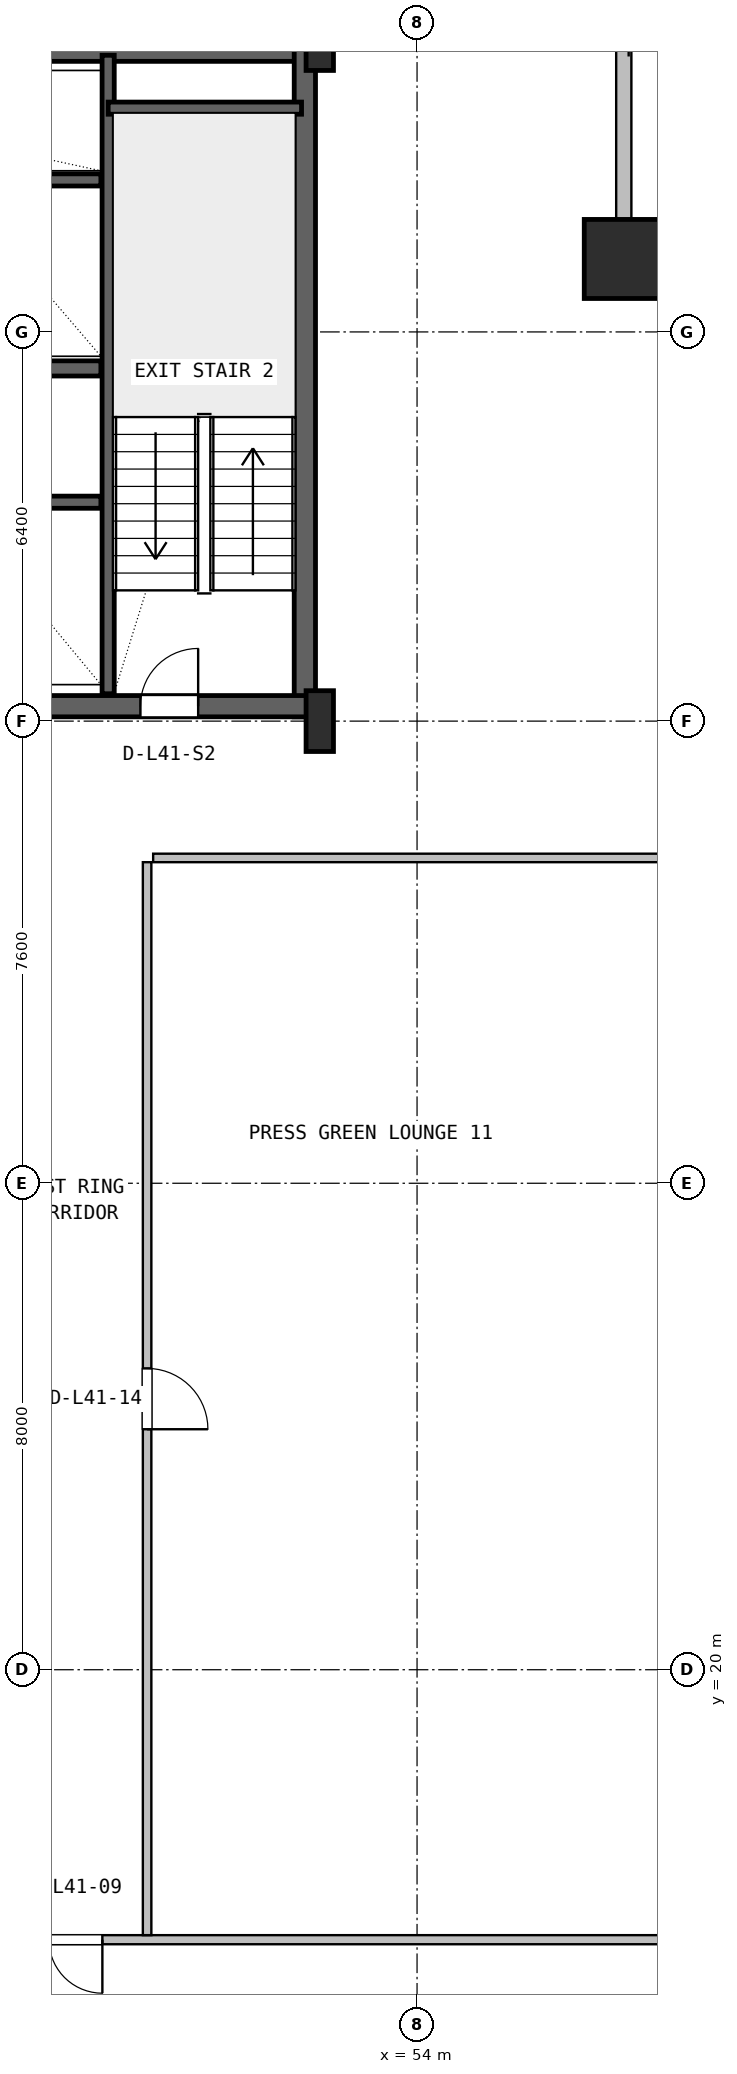
"""IFC4 building model, lengths in metres.
Left out: names, types, materials, properties, quantities, classifications, styles, units other than length and angle.
Written with IfcOpenShell. Run it as: python <this file> out.ifc"""

import sys

from ifc_helpers import new_model, si_unit, direction, frame, frame_2d, origin, origin_2d, place, context, subcontext, project, spatial, rectangle, hollow_rectangle, i_section, extrude, source, transform, mapped, element, fill, save


model = new_model("IFC4")
c1 = context("Model", 3, precision=1e-05, world=origin(), true_north=direction((0.0, 1.0)))
c2 = subcontext(c1, "Body", "Model", "MODEL_VIEW")
j1 = project(units=[si_unit("LENGTHUNIT", "METRE"), si_unit("PLANEANGLEUNIT", "RADIAN")], contexts=[c1])
p1 = place(None, origin())
s1 = spatial("IfcSite", under=j1, at=p1, CompositionType="ELEMENT")
p2 = place(p1, origin())
s2 = spatial("IfcBuilding", under=s1, at=p2, CompositionType="ELEMENT")
p3 = place(p2, frame((0.0, 0.0, 168.6)))
s3 = spatial("IfcBuildingStorey", under=s2, at=p3, CompositionType="ELEMENT", Elevation=168.6)
p4 = place(p3, frame((15.6, 46.625, 0.0), z_axis=(0.0, 0.0, 1.0), x_axis=(1.0, 0.0, 0.0)))
e1 = element("IfcWall", 1, at=p4, inside=s3, PredefinedType="SHEAR", context=c2, shape_type="SweptSolid", body=[
    extrude(rectangle(XDim=36.8, YDim=0.35, at=frame_2d((18.4, 0.0))), origin(), (0.0, 0.0, 1.0), 3.55),
])
p5 = place(p3, frame((52.155, 35.67, 0.0), z_axis=(0.0, 0.0, 1.0), x_axis=(0.0, 1.0, 0.0)))
e2 = element("IfcWall", 2, at=p5, inside=s3, PredefinedType="SHEAR", context=c2, shape_type="SweptSolid", body=[
    extrude(rectangle(XDim=11.13, YDim=0.35, at=frame_2d((5.565, 0.0))), origin(), (0.0, 0.0, 1.0), 3.55),
])
p6 = place(p3, frame((43.2, 35.845, 0.0), z_axis=(0.0, 0.0, 1.0), x_axis=(1.0, 0.0, 0.0)))
e3 = element("IfcWall", 3, at=p6, inside=s3, PredefinedType="SHEAR", context=c2, shape_type="SweptSolid", body=[
    extrude(rectangle(XDim=9.13, YDim=0.35, at=frame_2d((4.565, 0.0))), origin(), (0.0, 0.0, 1.0), 3.55),
])
p7 = place(p6, frame((6.25, 0.0, 0.0)))
e4 = element("IfcOpeningElement", 4, at=p7, cuts=e3, PredefinedType="OPENING", context=c2, shape_type="SweptSolid", body=[
    extrude(rectangle(XDim=0.95, YDim=2.1, at=frame_2d((0.475, 1.05))), frame((0.0, 0.185, 0.0), z_axis=(0.0, -1.0, 0.0), x_axis=(1.0, 0.0, 0.0)), (0.0, 0.0, 1.0), 0.37),
])
m1 = source(origin(), c2, "Body", "SweptSolid", [
    extrude(i_section(OverallWidth=0.45, OverallDepth=1.0, WebThickness=0.016, FlangeThickness=0.03, FilletRadius=0.016, at=origin_2d()), origin(), (0.0, 0.0, 1.0), 3.8),
])
for number, where, z_axis, x_axis in (
    (5, (52.4, 35.6, 0.0), (0.0, 0.0, 1.0), (1.0, 0.0, 0.0)),
    (6, (52.4, 46.8, 0.0), (0.0, 0.0, 1.0), (1.0, 0.0, 0.0)),
):
    element("IfcColumn", number, at=place(p3, frame(where, z_axis=z_axis, x_axis=x_axis)), inside=s3, PredefinedType="COLUMN", context=c2, shape_type="MappedRepresentation", body=[
        mapped(m1, transform((0.0, 0.0, 0.0), x_axis=(1.0, 0.0, 0.0), y_axis=(0.0, 1.0, 0.0), z_axis=(0.0, 0.0, 1.0), scale=1.0)),
    ])
m2 = source(origin(), c2, "Body", "SweptSolid", [
    extrude(hollow_rectangle(XDim=1.3, YDim=1.3, WallThickness=0.05, at=origin_2d()), origin(), (0.0, 0.0, 1.0), 3.8),
])
p8 = place(p3, frame((57.4, 43.2, 0.0), z_axis=(0.0, 0.0, 1.0), x_axis=(1.0, 0.0, 0.0)))
e7 = element("IfcColumn", 7, at=p8, inside=s3, PredefinedType="COLUMN", context=c2, shape_type="MappedRepresentation", body=[
    mapped(m2, transform((0.0, 0.0, 0.0), x_axis=(1.0, 0.0, 0.0), y_axis=(0.0, 1.0, 0.0), z_axis=(0.0, 0.0, 1.0), scale=1.0)),
])
p9 = place(p3, frame((57.53, 43.2, 0.0), z_axis=(0.0, 0.0, 1.0), x_axis=(1.0, 0.0, 0.0)))
e8 = element("IfcWall", 8, at=p9, inside=s3, PredefinedType="SOLIDWALL", context=c2, shape_type="SweptSolid", body=[
    extrude(rectangle(XDim=3.39, YDim=0.25, at=frame_2d((1.695, 0.0))), origin(), (0.0, 0.0, 1.0), 3.53),
])
p10 = place(p3, frame((57.4, 43.12, 0.0), z_axis=(0.0, 0.0, 1.0), x_axis=(0.0, 1.0, 0.0)))
e9 = element("IfcWall", 9, at=p10, inside=s3, PredefinedType="SOLIDWALL", context=c2, shape_type="SweptSolid", body=[
    extrude(rectangle(XDim=3.6, YDim=0.25, at=frame_2d((1.8, 0.0))), origin(), (0.0, 0.0, 1.0), 3.108),
])
p11 = place(p3, frame((48.92, 36.05, 0.0), z_axis=(0.0, 0.0, 1.0), x_axis=(0.0, 1.0, 0.0)))
e10 = element("IfcWall", 10, at=p11, inside=s3, PredefinedType="SHEAR", context=c2, shape_type="SweptSolid", body=[
    extrude(rectangle(XDim=10.5, YDim=0.2, at=frame_2d((5.25, 0.0))), origin(), (0.0, 0.0, 1.0), 3.55),
])
p12 = place(p3, frame((48.92, 45.68, 0.0), z_axis=(0.0, 0.0, 1.0), x_axis=(1.0, 0.0, 0.0)))
e11 = element("IfcWall", 11, at=p12, inside=s3, PredefinedType="SHEAR", context=c2, shape_type="SweptSolid", body=[
    extrude(rectangle(XDim=3.18, YDim=0.2, at=frame_2d((1.59, 0.0))), origin(), (0.0, 0.0, 1.0), 3.55),
])
p13 = place(p3, frame((24.98, 41.4, 0.0), z_axis=(0.0, 0.0, 1.0), x_axis=(1.0, 0.0, 0.0)))
e12 = element("IfcWall", 12, at=p13, inside=s3, PredefinedType="SHEAR", context=c2, shape_type="SweptSolid", body=[
    extrude(rectangle(XDim=23.82, YDim=0.25, at=frame_2d((11.91, 0.0))), origin(), (0.0, 0.0, 1.0), 3.55),
])
p14 = place(p13, frame((8.87, 0.0, 0.0)))
e13 = element("IfcOpeningElement", 13, at=p14, cuts=e12, PredefinedType="OPENING", context=c2, shape_type="SweptSolid", body=[
    extrude(rectangle(XDim=1.1, YDim=2.18, at=frame_2d((0.55, 1.09))), frame((0.0, 0.135, 0.0), z_axis=(0.0, -1.0, 0.0), x_axis=(1.0, 0.0, 0.0)), (0.0, 0.0, 1.0), 0.27),
])
p15 = place(p13, frame((11.47, 0.0, 0.0)))
e14 = element("IfcOpeningElement", 14, at=p15, cuts=e12, PredefinedType="OPENING", context=c2, shape_type="SweptSolid", body=[
    extrude(rectangle(XDim=1.1, YDim=2.18, at=frame_2d((0.55, 1.09))), frame((0.0, 0.135, 0.0), z_axis=(0.0, -1.0, 0.0), x_axis=(1.0, 0.0, 0.0)), (0.0, 0.0, 1.0), 0.27),
])
p16 = place(p13, frame((14.07, 0.0, 0.0)))
e15 = element("IfcOpeningElement", 15, at=p16, cuts=e12, PredefinedType="OPENING", context=c2, shape_type="SweptSolid", body=[
    extrude(rectangle(XDim=1.1, YDim=2.18, at=frame_2d((0.55, 1.09))), frame((0.0, 0.135, 0.0), z_axis=(0.0, -1.0, 0.0), x_axis=(1.0, 0.0, 0.0)), (0.0, 0.0, 1.0), 0.27),
])
p17 = place(p13, frame((3.56, 0.0, 0.0)))
e16 = element("IfcOpeningElement", 16, at=p17, cuts=e12, PredefinedType="OPENING", context=c2, shape_type="SweptSolid", body=[
    extrude(rectangle(XDim=1.0, YDim=2.08, at=frame_2d((0.5, 1.04))), frame((0.0, 0.135, 0.0), z_axis=(0.0, -1.0, 0.0), x_axis=(1.0, 0.0, 0.0)), (0.0, 0.0, 1.0), 0.27),
])
p18 = place(p3, frame((41.22, 44.5, 0.0), z_axis=(0.0, 0.0, 1.0), x_axis=(1.0, 0.0, 0.0)))
e17 = element("IfcWall", 17, at=p18, inside=s3, PredefinedType="SHEAR", context=c2, shape_type="SweptSolid", body=[
    extrude(rectangle(XDim=7.58, YDim=0.2, at=frame_2d((3.79, 0.0))), origin(), (0.0, 0.0, 1.0), 3.55),
])
p19 = place(p3, frame((43.65, 39.2, 0.0), z_axis=(0.0, 0.0, 1.0), x_axis=(1.0, 0.0, 0.0)))
e18 = element("IfcWall", 18, at=p19, inside=s3, PredefinedType="SHEAR", context=c2, shape_type="SweptSolid", body=[
    extrude(rectangle(XDim=5.15, YDim=0.2, at=frame_2d((2.575, 0.0))), origin(), (0.0, 0.0, 1.0), 3.55),
])
p20 = place(p3, frame((7.18, 15.56, 0.0), z_axis=(0.0, 0.0, 1.0), x_axis=(1.0, 0.0, 0.0)))
e19 = element("IfcWall", 19, at=p20, inside=s3, PredefinedType="PARTITIONING", context=c2, shape_type="SweptSolid", body=[
    extrude(rectangle(XDim=53.64, YDim=0.15, at=frame_2d((26.82, 0.0))), origin(), (0.0, 0.0, 1.0), 2.909),
])
p21 = place(p20, frame((13.665, 0.0, 0.0)))
e20 = element("IfcOpeningElement", 20, at=p21, cuts=e19, PredefinedType="OPENING", context=c2, shape_type="SweptSolid", body=[
    extrude(rectangle(XDim=0.92, YDim=2.08, at=frame_2d((0.46, 1.04))), frame((0.0, 0.085, 0.0), z_axis=(0.0, -1.0, 0.0), x_axis=(1.0, 0.0, 0.0)), (0.0, 0.0, 1.0), 0.17),
])
p22 = place(p20, frame((17.955, 0.0, 0.0)))
e21 = element("IfcOpeningElement", 21, at=p22, cuts=e19, PredefinedType="OPENING", context=c2, shape_type="SweptSolid", body=[
    extrude(rectangle(XDim=0.92, YDim=2.08, at=frame_2d((0.46, 1.04))), frame((0.0, 0.085, 0.0), z_axis=(0.0, -1.0, 0.0), x_axis=(1.0, 0.0, 0.0)), (0.0, 0.0, 1.0), 0.17),
])
p23 = place(p20, frame((24.915, 0.0, 0.0)))
e22 = element("IfcOpeningElement", 22, at=p23, cuts=e19, PredefinedType="OPENING", context=c2, shape_type="SweptSolid", body=[
    extrude(rectangle(XDim=1.05, YDim=2.1, at=frame_2d((0.525, 1.05))), frame((0.0, 0.085, 0.0), z_axis=(0.0, -1.0, 0.0), x_axis=(1.0, 0.0, 0.0)), (0.0, 0.0, 1.0), 0.17),
])
p24 = place(p20, frame((31.13, 0.0, 0.0)))
e23 = element("IfcOpeningElement", 23, at=p24, cuts=e19, PredefinedType="OPENING", context=c2, shape_type="SweptSolid", body=[
    extrude(rectangle(XDim=0.88, YDim=2.06, at=frame_2d((0.44, 1.03))), frame((0.0, 0.085, 0.0), z_axis=(0.0, -1.0, 0.0), x_axis=(1.0, 0.0, 0.0)), (0.0, 0.0, 1.0), 0.17),
])
p25 = place(p20, frame((36.41, 0.0, 0.0)))
e24 = element("IfcOpeningElement", 24, at=p25, cuts=e19, PredefinedType="OPENING", context=c2, shape_type="SweptSolid", body=[
    extrude(rectangle(XDim=1.0, YDim=2.1, at=frame_2d((0.5, 1.05))), frame((0.0, 0.085, 0.0), z_axis=(0.0, -1.0, 0.0), x_axis=(1.0, 0.0, 0.0)), (0.0, 0.0, 1.0), 0.17),
])
p26 = place(p20, frame((40.765, 0.0, 0.0)))
e25 = element("IfcOpeningElement", 25, at=p26, cuts=e19, PredefinedType="OPENING", context=c2, shape_type="SweptSolid", body=[
    extrude(rectangle(XDim=0.88, YDim=2.06, at=frame_2d((0.44, 1.03))), frame((0.0, 0.085, 0.0), z_axis=(0.0, -1.0, 0.0), x_axis=(1.0, 0.0, 0.0)), (0.0, 0.0, 1.0), 0.17),
])
p27 = place(p3, frame((49.66, 33.35, 0.0), z_axis=(0.0, 0.0, 1.0), x_axis=(1.0, 0.0, 0.0)))
e26 = element("IfcWall", 26, at=p27, inside=s3, PredefinedType="PARTITIONING", context=c2, shape_type="SweptSolid", body=[
    extrude(rectangle(XDim=11.16, YDim=0.14, at=frame_2d((5.58, 0.0))), origin(), (0.0, 0.0, 1.0), 3.108),
])
p28 = place(p3, frame((49.56, 15.635, 0.0), z_axis=(0.0, 0.0, 1.0), x_axis=(0.0, 1.0, 0.0)))
e27 = element("IfcWall", 27, at=p28, inside=s3, PredefinedType="PARTITIONING", context=c2, shape_type="SweptSolid", body=[
    extrude(rectangle(XDim=17.645, YDim=0.14, at=frame_2d((8.823, 0.0))), origin(), (0.0, 0.0, 1.0), 3.222),
])
p29 = place(p28, frame((8.32, 0.0, 0.0)))
e28 = element("IfcOpeningElement", 28, at=p29, cuts=e27, PredefinedType="OPENING", context=c2, shape_type="SweptSolid", body=[
    extrude(rectangle(XDim=1.0, YDim=2.1, at=frame_2d((0.5, 1.05))), frame((0.0, 0.08, 0.0), z_axis=(0.0, -1.0, 0.0), x_axis=(1.0, 0.0, 0.0)), (0.0, 0.0, 1.0), 0.16),
])
m3 = source(origin(), c2, "Body", "SweptSolid", [
    extrude(rectangle(XDim=0.95, YDim=2.1, at=frame_2d((0.475, 1.05))), frame((0.0, 0.025, 0.0), z_axis=(0.0, -1.0, 0.0), x_axis=(1.0, 0.0, 0.0)), (0.0, 0.0, 1.0), 0.05),
])
p30 = place(p7, origin())
e29 = element("IfcDoor", 29, at=p30, inside=s3, OperationType="SINGLE_SWING_RIGHT", PredefinedType="DOOR", context=c2, shape_type="MappedRepresentation", body=[
    mapped(m3, transform((0.0, 0.0, 0.0), x_axis=(1.0, 0.0, 0.0), y_axis=(0.0, 1.0, 0.0), z_axis=(0.0, 0.0, 1.0), scale=1.0)),
])
fill(e4, e29)
m4 = source(origin(), c2, "Body", "SweptSolid", [
    extrude(rectangle(XDim=0.88, YDim=2.06, at=frame_2d((0.44, 1.03))), frame((0.0, 0.025, 0.0), z_axis=(0.0, -1.0, 0.0), x_axis=(1.0, 0.0, 0.0)), (0.0, 0.0, 1.0), 0.05),
])
p31 = place(p26, frame((0.88, 0.0, 0.0), z_axis=(0.0, 0.0, 1.0), x_axis=(-1.0, 0.0, 0.0)))
e30 = element("IfcDoor", 30, at=p31, inside=s3, OperationType="SINGLE_SWING_RIGHT", PredefinedType="DOOR", context=c2, shape_type="MappedRepresentation", body=[
    mapped(m4, transform((0.0, 0.0, 0.0), x_axis=(1.0, 0.0, 0.0), y_axis=(0.0, 1.0, 0.0), z_axis=(0.0, 0.0, 1.0), scale=1.0)),
])
fill(e25, e30)
m5 = source(origin(), c2, "Body", "SweptSolid", [
    extrude(rectangle(XDim=1.0, YDim=2.1, at=frame_2d((0.5, 1.05))), frame((0.0, 0.025, 0.0), z_axis=(0.0, -1.0, 0.0), x_axis=(1.0, 0.0, 0.0)), (0.0, 0.0, 1.0), 0.05),
])
p32 = place(p29, frame((1.0, 0.0, 0.0), z_axis=(0.0, 0.0, 1.0), x_axis=(-1.0, 0.0, 0.0)))
e31 = element("IfcDoor", 31, at=p32, inside=s3, OperationType="SINGLE_SWING_LEFT", PredefinedType="DOOR", context=c2, shape_type="MappedRepresentation", body=[
    mapped(m5, transform((0.0, 0.0, 0.0), x_axis=(1.0, 0.0, 0.0), y_axis=(0.0, 1.0, 0.0), z_axis=(0.0, 0.0, 1.0), scale=1.0)),
])
fill(e28, e31)
save(model, sys.argv[1])
